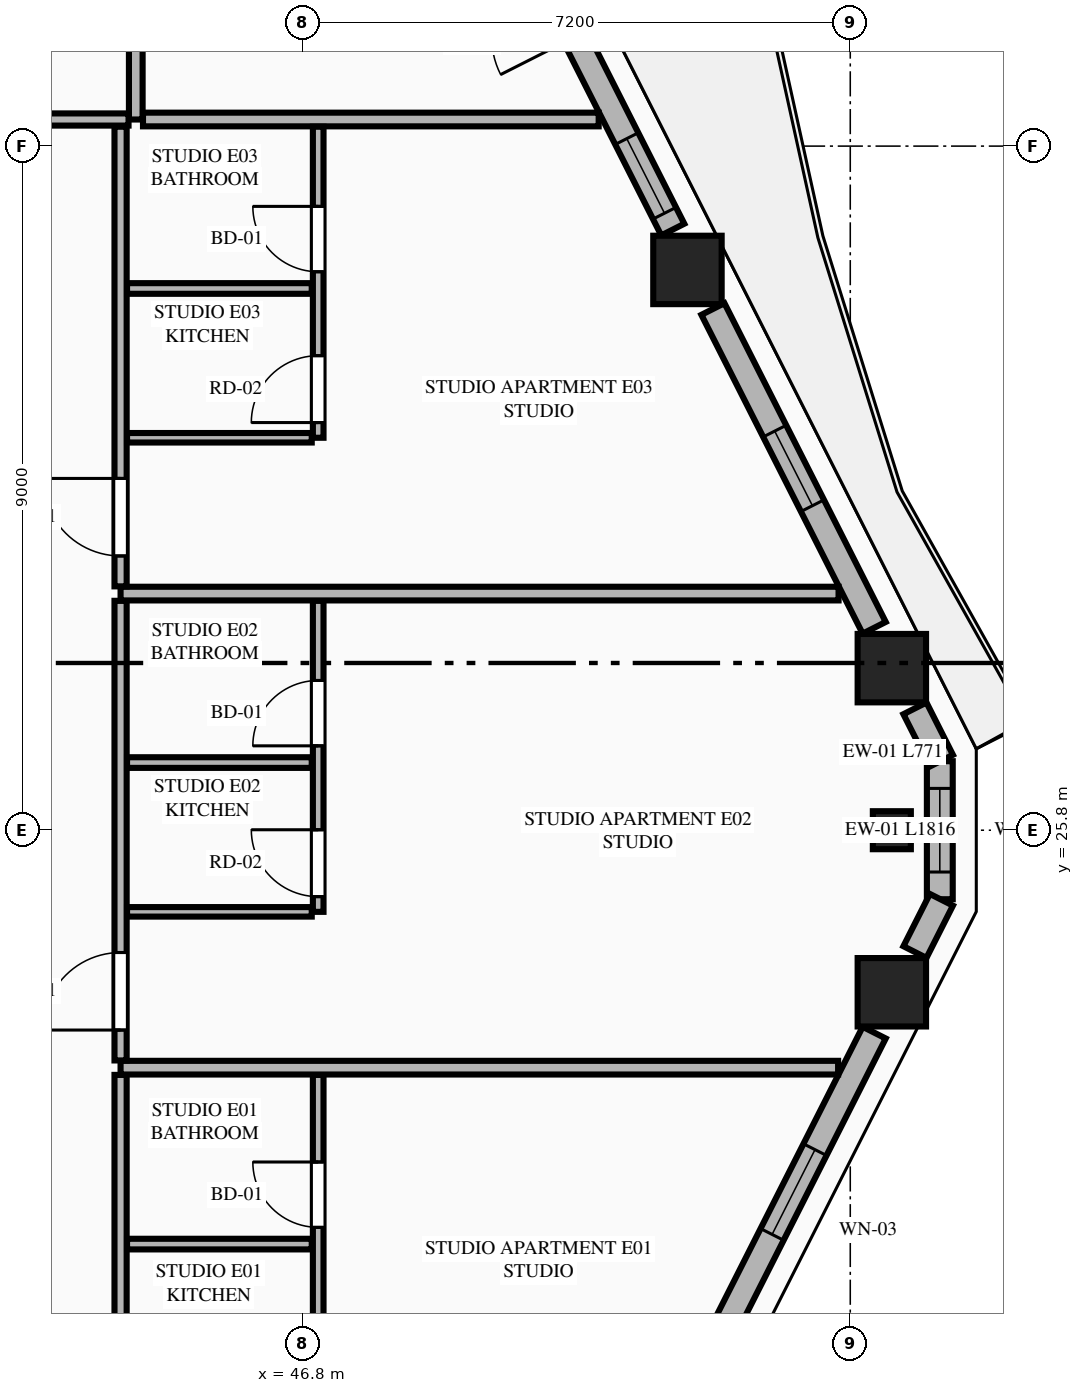
"""IFC4 building model, lengths in metres.
Left out: names, types, materials, properties, quantities, classifications, styles, units other than length and angle.
Written with IfcOpenShell. Run it as: python <this file> out.ifc"""

import sys

from ifc_helpers import new_model, si_unit, direction, frame, frame_2d, origin, origin_2d, place, context, subcontext, project, spatial, rectangle, extrude, element, fill, save


model = new_model("IFC4")
c1 = context("Model", 3, precision=1e-05, world=origin(), true_north=direction((0.0, 1.0)))
c2 = subcontext(c1, "Body", "Model", "MODEL_VIEW")
j1 = project(units=[si_unit("LENGTHUNIT", "METRE"), si_unit("PLANEANGLEUNIT", "RADIAN")], contexts=[c1])
p1 = place(None, origin())
s1 = spatial("IfcSite", under=j1, at=p1, CompositionType="ELEMENT")
p2 = place(p1, origin())
s2 = spatial("IfcBuilding", under=s1, at=p2, CompositionType="ELEMENT")
p3 = place(p2, frame((0.0, 0.0, 200.3)))
s3 = spatial("IfcBuildingStorey", under=s2, at=p3, CompositionType="ELEMENT", Elevation=200.3)
for number, where, z_axis, x_axis in (
    (1, (54.547, 23.668, 0.0), (0.0, 0.0, 1.0), (1.0, 0.0, 0.0)),
    (2, (54.547, 27.932, 0.0), (0.0, 0.0, 1.0), (1.0, 0.0, 0.0)),
    (3, (51.858, 33.171, 0.0), (0.0, 0.0, 1.0), (1.0, 0.0, 0.0)),
):
    element("IfcColumn", number, at=place(p3, frame(where, z_axis=z_axis, x_axis=x_axis)), inside=s3, PredefinedType="COLUMN", context=c2, shape_type="SweptSolid", body=[
        extrude(rectangle(XDim=0.9, YDim=0.9, at=origin_2d()), origin(), (0.0, 0.0, 1.0), 3.55),
    ])
p4 = place(p3, frame((54.547, 25.8, 0.0), z_axis=(0.0, 0.0, 1.0), x_axis=(0.0, 1.0, 0.0)))
e4 = element("IfcColumn", 4, at=p4, inside=s3, PredefinedType="PILASTER", context=c2, shape_type="SweptSolid", body=[
    extrude(rectangle(XDim=0.5, YDim=0.35, at=origin_2d()), origin(), (0.0, 0.0, 1.0), 3.55),
])
p5 = place(p3, frame((55.178, 24.892, 0.0), z_axis=(0.0, 0.0, 1.0), x_axis=(0.0, 1.0, 0.0)))
e5 = element("IfcWall", 5, at=p5, inside=s3, PredefinedType="STANDARD", context=c2, shape_type="SweptSolid", body=[
    extrude(rectangle(XDim=1.816, YDim=0.34, at=frame_2d((0.908, 0.0))), origin(), (0.0, 0.0, 1.0), 3.35),
])
p6 = place(p5, frame((0.358, 0.0, 0.75)))
e6 = element("IfcOpeningElement", 6, at=p6, cuts=e5, PredefinedType="OPENING", context=c2, shape_type="SweptSolid", body=[
    extrude(rectangle(XDim=1.1, YDim=2.0, at=frame_2d((0.55, 1.0))), frame((0.0, 0.18, 0.0), z_axis=(0.0, -1.0, 0.0), x_axis=(1.0, 0.0, 0.0)), (0.0, 0.0, 1.0), 0.36),
])
p7 = place(p3, frame((52.193, 18.943, 0.0), z_axis=(0.0, 0.0, 1.0), x_axis=(0.451447222193, 0.892297823361, 0.0)))
e7 = element("IfcWall", 7, at=p7, inside=s3, PredefinedType="STANDARD", context=c2, shape_type="SweptSolid", body=[
    extrude(rectangle(XDim=4.7, YDim=0.34, at=frame_2d((2.35, 0.0))), origin(), (0.0, 0.0, 1.0), 2.883),
])
p8 = place(p7, frame((1.725, 0.0, 0.75)))
e8 = element("IfcOpeningElement", 8, at=p8, cuts=e7, PredefinedType="OPENING", context=c2, shape_type="SweptSolid", body=[
    extrude(rectangle(XDim=1.25, YDim=1.95, at=frame_2d((0.625, 0.975))), frame((0.0, 0.18, 0.0), z_axis=(0.0, -1.0, 0.0), x_axis=(1.0, 0.0, 0.0)), (0.0, 0.0, 1.0), 0.36),
])
for number, where, z_axis, x_axis in (
    (9, (54.851, 24.197, 0.0), (0.0, 0.0, 1.0), (0.451, 0.892, 0.0)),
    (10, (55.199, 26.715, 0.0), (0.0, 0.0, 1.0), (-0.451, 0.892, 0.0)),
):
    element("IfcWall", number, at=place(p3, frame(where, z_axis=z_axis, x_axis=x_axis)), inside=s3, PredefinedType="STANDARD", context=c2, shape_type="SweptSolid", body=[
        extrude(rectangle(XDim=0.771, YDim=0.34, at=frame_2d((0.385, 0.0))), origin(), (0.0, 0.0, 1.0), 3.35),
    ])
p9 = place(p3, frame((54.315, 28.463, 0.0), z_axis=(0.0, 0.0, 1.0), x_axis=(-0.451426298588, 0.892308409096, 0.0)))
e11 = element("IfcWall", 11, at=p9, inside=s3, PredefinedType="STANDARD", context=c2, shape_type="SweptSolid", body=[
    extrude(rectangle(XDim=4.7, YDim=0.34, at=frame_2d((2.35, 0.0))), origin(), (0.0, 0.0, 1.0), 2.883),
])
p10 = place(p9, frame((1.8, 0.0, 0.75)))
e12 = element("IfcOpeningElement", 12, at=p10, cuts=e11, PredefinedType="OPENING", context=c2, shape_type="SweptSolid", body=[
    extrude(rectangle(XDim=1.1, YDim=1.983, at=frame_2d((0.55, 0.991))), frame((0.0, 0.18, 0.0), z_axis=(0.0, -1.0, 0.0), x_axis=(1.0, 0.0, 0.0)), (0.0, 0.0, 1.0), 0.36),
])
p11 = place(p3, frame((51.665, 33.702, 0.0), z_axis=(0.0, 0.0, 1.0), x_axis=(-0.451524246964, 0.89225884944, 0.0)))
e13 = element("IfcWall", 13, at=p11, inside=s3, PredefinedType="STANDARD", context=c2, shape_type="SweptSolid", body=[
    extrude(rectangle(XDim=4.91, YDim=0.34, at=frame_2d((2.455, 0.0))), origin(), (0.0, 0.0, 1.0), 2.883),
])
p12 = place(p11, frame((2.842, 0.0, 0.0)))
e14 = element("IfcOpeningElement", 14, at=p12, cuts=e13, PredefinedType="OPENING", context=c2, shape_type="SweptSolid", body=[
    extrude(rectangle(XDim=1.1, YDim=2.25, at=frame_2d((0.55, 1.125))), frame((0.0, 0.18, 0.0), z_axis=(0.0, -1.0, 0.0), x_axis=(1.0, 0.0, 0.0)), (0.0, 0.0, 1.0), 0.36),
])
p13 = place(p11, frame((0.241, 0.0, 0.75)))
e15 = element("IfcOpeningElement", 15, at=p13, cuts=e13, PredefinedType="OPENING", context=c2, shape_type="SweptSolid", body=[
    extrude(rectangle(XDim=1.1, YDim=1.983, at=frame_2d((0.55, 0.991))), frame((0.0, 0.18, 0.0), z_axis=(0.0, -1.0, 0.0), x_axis=(1.0, 0.0, 0.0)), (0.0, 0.0, 1.0), 0.36),
])
p14 = place(p3, frame((44.6, 35.15, 0.0), z_axis=(0.0, 0.0, 1.0), x_axis=(0.0, 1.0, 0.0)))
e16 = element("IfcWall", 16, at=p14, inside=s3, PredefinedType="PARTITIONING", context=c2, shape_type="SweptSolid", body=[
    extrude(rectangle(XDim=10.482, YDim=0.18, at=frame_2d((5.241, 0.0))), origin(), (0.0, 0.0, 1.0), 3.35),
])
p15 = place(p3, frame((36.038, 35.15, 0.0), z_axis=(0.0, 0.0, 1.0), x_axis=(1.0, 0.0, 0.0)))
e17 = element("IfcWall", 17, at=p15, inside=s3, PredefinedType="PARTITIONING", context=c2, shape_type="SweptSolid", body=[
    extrude(rectangle(XDim=8.467, YDim=0.16, at=frame_2d((4.233, 0.0))), origin(), (0.0, 0.0, 1.0), 3.35),
])
p16 = place(p15, frame((6.212, 0.0, 0.0)))
e18 = element("IfcOpeningElement", 18, at=p16, cuts=e17, PredefinedType="OPENING", context=c2, shape_type="SweptSolid", body=[
    extrude(rectangle(XDim=1.02, YDim=2.25, at=frame_2d((0.51, 1.125))), frame((0.0, 0.09, 0.0), z_axis=(0.0, -1.0, 0.0), x_axis=(1.0, 0.0, 0.0)), (0.0, 0.0, 1.0), 0.18),
])
p17 = place(p3, frame((44.695, 35.15, 0.0), z_axis=(0.0, 0.0, 1.0), x_axis=(1.0, 0.0, 0.0)))
e19 = element("IfcWall", 19, at=p17, inside=s3, PredefinedType="PARTITIONING", context=c2, shape_type="SweptSolid", body=[
    extrude(rectangle(XDim=5.995, YDim=0.18, at=frame_2d((2.998, 0.0))), origin(), (0.0, 0.0, 1.0), 3.35),
])
p18 = place(p3, frame((44.4, 16.345, 0.0), z_axis=(0.0, 0.0, 1.0), x_axis=(0.0, 1.0, 0.0)))
e20 = element("IfcWall", 20, at=p18, inside=s3, PredefinedType="PARTITIONING", context=c2, shape_type="SweptSolid", body=[
    extrude(rectangle(XDim=6.236, YDim=0.16, at=frame_2d((3.118, 0.0))), origin(), (0.0, 0.0, 1.0), 3.35),
])
p19 = place(p18, frame((0.4, 0.0, 0.0)))
e21 = element("IfcOpeningElement", 21, at=p19, cuts=e20, PredefinedType="OPENING", context=c2, shape_type="SweptSolid", body=[
    extrude(rectangle(XDim=1.02, YDim=2.25, at=frame_2d((0.51, 1.125))), frame((0.0, 0.09, 0.0), z_axis=(0.0, -1.0, 0.0), x_axis=(1.0, 0.0, 0.0)), (0.0, 0.0, 1.0), 0.18),
])
p20 = place(p3, frame((47.0, 18.3, 0.0), z_axis=(0.0, 0.0, 1.0), x_axis=(0.0, 1.0, 0.0)))
e22 = element("IfcWall", 22, at=p20, inside=s3, PredefinedType="PLUMBINGWALL", context=c2, shape_type="SweptSolid", body=[
    extrude(rectangle(XDim=4.281, YDim=0.14, at=frame_2d((2.141, 0.0))), origin(), (0.0, 0.0, 1.0), 3.35),
])
p21 = place(p20, frame((2.275, 0.0, 0.0)))
e23 = element("IfcOpeningElement", 23, at=p21, cuts=e22, PredefinedType="OPENING", context=c2, shape_type="SweptSolid", body=[
    extrude(rectangle(XDim=0.86, YDim=2.1, at=frame_2d((0.43, 1.05))), frame((0.0, 0.08, 0.0), z_axis=(0.0, -1.0, 0.0), x_axis=(1.0, 0.0, 0.0)), (0.0, 0.0, 1.0), 0.16),
])
p22 = place(p20, frame((0.2, 0.0, 0.0)))
e24 = element("IfcOpeningElement", 24, at=p22, cuts=e22, PredefinedType="OPENING", context=c2, shape_type="SweptSolid", body=[
    extrude(rectangle(XDim=0.88, YDim=2.15, at=frame_2d((0.44, 1.075))), frame((0.0, 0.08, 0.0), z_axis=(0.0, -1.0, 0.0), x_axis=(1.0, 0.0, 0.0)), (0.0, 0.0, 1.0), 0.16),
])
p23 = place(p3, frame((44.485, 20.355, 0.0), z_axis=(0.0, 0.0, 1.0), x_axis=(1.0, 0.0, 0.0)))
e25 = element("IfcWall", 25, at=p23, inside=s3, PredefinedType="PLUMBINGWALL", context=c2, shape_type="SweptSolid", body=[
    extrude(rectangle(XDim=2.43, YDim=0.14, at=frame_2d((1.215, 0.0))), origin(), (0.0, 0.0, 1.0), 3.35),
])
p24 = place(p3, frame((44.4, 22.676, 0.0), z_axis=(0.0, 0.0, 1.0), x_axis=(1.0, 0.0, 0.0)))
e26 = element("IfcWall", 26, at=p24, inside=s3, PredefinedType="PARTITIONING", context=c2, shape_type="SweptSolid", body=[
    extrude(rectangle(XDim=9.44, YDim=0.18, at=frame_2d((4.72, 0.0))), origin(), (0.0, 0.0, 1.0), 3.35),
])
p25 = place(p3, frame((44.4, 22.771, 0.0), z_axis=(0.0, 0.0, 1.0), x_axis=(0.0, 1.0, 0.0)))
e27 = element("IfcWall", 27, at=p25, inside=s3, PredefinedType="PARTITIONING", context=c2, shape_type="SweptSolid", body=[
    extrude(rectangle(XDim=6.047, YDim=0.16, at=frame_2d((3.023, 0.0))), origin(), (0.0, 0.0, 1.0), 3.35),
])
p26 = place(p25, frame((0.4, 0.0, 0.0)))
e28 = element("IfcOpeningElement", 28, at=p26, cuts=e27, PredefinedType="OPENING", context=c2, shape_type="SweptSolid", body=[
    extrude(rectangle(XDim=1.02, YDim=2.25, at=frame_2d((0.51, 1.125))), frame((0.0, 0.09, 0.0), z_axis=(0.0, -1.0, 0.0), x_axis=(1.0, 0.0, 0.0)), (0.0, 0.0, 1.0), 0.18),
])
p27 = place(p3, frame((44.485, 24.726, 0.0), z_axis=(0.0, 0.0, 1.0), x_axis=(1.0, 0.0, 0.0)))
e29 = element("IfcWall", 29, at=p27, inside=s3, PredefinedType="PARTITIONING", context=c2, shape_type="SweptSolid", body=[
    extrude(rectangle(XDim=2.43, YDim=0.125, at=frame_2d((1.215, 0.0))), origin(), (0.0, 0.0, 1.0), 3.35),
])
p28 = place(p3, frame((47.0, 24.726, 0.0), z_axis=(0.0, 0.0, 1.0), x_axis=(0.0, 1.0, 0.0)))
e30 = element("IfcWall", 30, at=p28, inside=s3, PredefinedType="PLUMBINGWALL", context=c2, shape_type="SweptSolid", body=[
    extrude(rectangle(XDim=4.092, YDim=0.14, at=frame_2d((2.046, 0.0))), origin(), (0.0, 0.0, 1.0), 3.35),
])
p29 = place(p28, frame((2.184, 0.0, 0.0)))
e31 = element("IfcOpeningElement", 31, at=p29, cuts=e30, PredefinedType="OPENING", context=c2, shape_type="SweptSolid", body=[
    extrude(rectangle(XDim=0.86, YDim=2.1, at=frame_2d((0.43, 1.05))), frame((0.0, 0.08, 0.0), z_axis=(0.0, -1.0, 0.0), x_axis=(1.0, 0.0, 0.0)), (0.0, 0.0, 1.0), 0.16),
])
p30 = place(p28, frame((0.2, 0.0, 0.0)))
e32 = element("IfcOpeningElement", 32, at=p30, cuts=e30, PredefinedType="OPENING", context=c2, shape_type="SweptSolid", body=[
    extrude(rectangle(XDim=0.88, YDim=2.15, at=frame_2d((0.44, 1.075))), frame((0.0, 0.08, 0.0), z_axis=(0.0, -1.0, 0.0), x_axis=(1.0, 0.0, 0.0)), (0.0, 0.0, 1.0), 0.16),
])
p31 = place(p3, frame((44.485, 26.69, 0.0), z_axis=(0.0, 0.0, 1.0), x_axis=(1.0, 0.0, 0.0)))
e33 = element("IfcWall", 33, at=p31, inside=s3, PredefinedType="PLUMBINGWALL", context=c2, shape_type="SweptSolid", body=[
    extrude(rectangle(XDim=2.43, YDim=0.14, at=frame_2d((1.215, 0.0))), origin(), (0.0, 0.0, 1.0), 3.35),
])
p32 = place(p3, frame((44.4, 28.913, 0.0), z_axis=(0.0, 0.0, 1.0), x_axis=(1.0, 0.0, 0.0)))
e34 = element("IfcWall", 34, at=p32, inside=s3, PredefinedType="PARTITIONING", context=c2, shape_type="SweptSolid", body=[
    extrude(rectangle(XDim=9.446, YDim=0.18, at=frame_2d((4.723, 0.0))), origin(), (0.0, 0.0, 1.0), 3.35),
])
p33 = place(p3, frame((44.4, 29.008, 0.0), z_axis=(0.0, 0.0, 1.0), x_axis=(0.0, 1.0, 0.0)))
e35 = element("IfcWall", 35, at=p33, inside=s3, PredefinedType="PARTITIONING", context=c2, shape_type="SweptSolid", body=[
    extrude(rectangle(XDim=6.047, YDim=0.16, at=frame_2d((3.023, 0.0))), origin(), (0.0, 0.0, 1.0), 3.35),
])
p34 = place(p33, frame((0.4, 0.0, 0.0)))
e36 = element("IfcOpeningElement", 36, at=p34, cuts=e35, PredefinedType="OPENING", context=c2, shape_type="SweptSolid", body=[
    extrude(rectangle(XDim=1.02, YDim=2.25, at=frame_2d((0.51, 1.125))), frame((0.0, 0.09, 0.0), z_axis=(0.0, -1.0, 0.0), x_axis=(1.0, 0.0, 0.0)), (0.0, 0.0, 1.0), 0.18),
])
p35 = place(p3, frame((44.485, 30.963, 0.0), z_axis=(0.0, 0.0, 1.0), x_axis=(1.0, 0.0, 0.0)))
e37 = element("IfcWall", 37, at=p35, inside=s3, PredefinedType="PARTITIONING", context=c2, shape_type="SweptSolid", body=[
    extrude(rectangle(XDim=2.43, YDim=0.125, at=frame_2d((1.215, 0.0))), origin(), (0.0, 0.0, 1.0), 3.35),
])
p36 = place(p3, frame((47.0, 30.963, 0.0), z_axis=(0.0, 0.0, 1.0), x_axis=(0.0, 1.0, 0.0)))
e38 = element("IfcWall", 38, at=p36, inside=s3, PredefinedType="PLUMBINGWALL", context=c2, shape_type="SweptSolid", body=[
    extrude(rectangle(XDim=4.092, YDim=0.14, at=frame_2d((2.046, 0.0))), origin(), (0.0, 0.0, 1.0), 3.35),
])
p37 = place(p36, frame((2.184, 0.0, 0.0)))
e39 = element("IfcOpeningElement", 39, at=p37, cuts=e38, PredefinedType="OPENING", context=c2, shape_type="SweptSolid", body=[
    extrude(rectangle(XDim=0.86, YDim=2.1, at=frame_2d((0.43, 1.05))), frame((0.0, 0.08, 0.0), z_axis=(0.0, -1.0, 0.0), x_axis=(1.0, 0.0, 0.0)), (0.0, 0.0, 1.0), 0.16),
])
p38 = place(p36, frame((0.2, 0.0, 0.0)))
e40 = element("IfcOpeningElement", 40, at=p38, cuts=e38, PredefinedType="OPENING", context=c2, shape_type="SweptSolid", body=[
    extrude(rectangle(XDim=0.88, YDim=2.15, at=frame_2d((0.44, 1.075))), frame((0.0, 0.08, 0.0), z_axis=(0.0, -1.0, 0.0), x_axis=(1.0, 0.0, 0.0)), (0.0, 0.0, 1.0), 0.16),
])
p39 = place(p3, frame((44.485, 32.927, 0.0), z_axis=(0.0, 0.0, 1.0), x_axis=(1.0, 0.0, 0.0)))
e41 = element("IfcWall", 41, at=p39, inside=s3, PredefinedType="PLUMBINGWALL", context=c2, shape_type="SweptSolid", body=[
    extrude(rectangle(XDim=2.43, YDim=0.14, at=frame_2d((1.215, 0.0))), origin(), (0.0, 0.0, 1.0), 3.35),
])
p40 = place(p8, origin())
e42 = element("IfcWindow", 42, at=p40, inside=s3, PartitioningType="SINGLE_PANEL", PredefinedType="WINDOW", context=c2, shape_type="SweptSolid", body=[
    extrude(rectangle(XDim=1.25, YDim=1.95, at=frame_2d((0.625, 0.975))), frame((0.0, 0.03, 0.0), z_axis=(0.0, -1.0, 0.0), x_axis=(1.0, 0.0, 0.0)), (0.0, 0.0, 1.0), 0.06),
])
fill(e8, e42)
p41 = place(p10, origin())
e43 = element("IfcWindow", 43, at=p41, inside=s3, PartitioningType="SINGLE_PANEL", PredefinedType="WINDOW", context=c2, shape_type="SweptSolid", body=[
    extrude(rectangle(XDim=1.1, YDim=1.983, at=frame_2d((0.55, 0.991))), frame((0.0, 0.03, 0.0), z_axis=(0.0, -1.0, 0.0), x_axis=(1.0, 0.0, 0.0)), (0.0, 0.0, 1.0), 0.06),
])
fill(e12, e43)
p42 = place(p21, origin())
e44 = element("IfcDoor", 44, at=p42, inside=s3, OperationType="SINGLE_SWING_RIGHT", PredefinedType="DOOR", context=c2, shape_type="SweptSolid", body=[
    extrude(rectangle(XDim=0.86, YDim=2.1, at=frame_2d((0.43, 1.05))), frame((0.0, 0.025, 0.0), z_axis=(0.0, -1.0, 0.0), x_axis=(1.0, 0.0, 0.0)), (0.0, 0.0, 1.0), 0.05),
])
fill(e23, e44)
p43 = place(p29, origin())
e45 = element("IfcDoor", 45, at=p43, inside=s3, OperationType="SINGLE_SWING_LEFT", PredefinedType="DOOR", context=c2, shape_type="SweptSolid", body=[
    extrude(rectangle(XDim=0.86, YDim=2.1, at=frame_2d((0.43, 1.05))), frame((0.0, 0.025, 0.0), z_axis=(0.0, -1.0, 0.0), x_axis=(1.0, 0.0, 0.0)), (0.0, 0.0, 1.0), 0.05),
])
fill(e31, e45)
p44 = place(p26, origin())
e46 = element("IfcDoor", 46, at=p44, inside=s3, OperationType="SINGLE_SWING_LEFT", PredefinedType="DOOR", context=c2, shape_type="SweptSolid", body=[
    extrude(rectangle(XDim=1.02, YDim=2.25, at=frame_2d((0.51, 1.125))), frame((0.0, 0.025, 0.0), z_axis=(0.0, -1.0, 0.0), x_axis=(1.0, 0.0, 0.0)), (0.0, 0.0, 1.0), 0.05),
])
fill(e28, e46)
p45 = place(p30, origin())
e47 = element("IfcDoor", 47, at=p45, inside=s3, OperationType="SINGLE_SWING_RIGHT", PredefinedType="DOOR", context=c2, shape_type="SweptSolid", body=[
    extrude(rectangle(XDim=0.88, YDim=2.15, at=frame_2d((0.44, 1.075))), frame((0.0, 0.025, 0.0), z_axis=(0.0, -1.0, 0.0), x_axis=(1.0, 0.0, 0.0)), (0.0, 0.0, 1.0), 0.05),
])
fill(e32, e47)
p46 = place(p37, origin())
e48 = element("IfcDoor", 48, at=p46, inside=s3, OperationType="SINGLE_SWING_RIGHT", PredefinedType="DOOR", context=c2, shape_type="SweptSolid", body=[
    extrude(rectangle(XDim=0.86, YDim=2.1, at=frame_2d((0.43, 1.05))), frame((0.0, 0.025, 0.0), z_axis=(0.0, -1.0, 0.0), x_axis=(1.0, 0.0, 0.0)), (0.0, 0.0, 1.0), 0.05),
])
fill(e39, e48)
p47 = place(p34, origin())
e49 = element("IfcDoor", 49, at=p47, inside=s3, OperationType="SINGLE_SWING_RIGHT", PredefinedType="DOOR", context=c2, shape_type="SweptSolid", body=[
    extrude(rectangle(XDim=1.02, YDim=2.25, at=frame_2d((0.51, 1.125))), frame((0.0, 0.025, 0.0), z_axis=(0.0, -1.0, 0.0), x_axis=(1.0, 0.0, 0.0)), (0.0, 0.0, 1.0), 0.05),
])
fill(e36, e49)
p48 = place(p38, origin())
e50 = element("IfcDoor", 50, at=p48, inside=s3, OperationType="SINGLE_SWING_LEFT", PredefinedType="DOOR", context=c2, shape_type="SweptSolid", body=[
    extrude(rectangle(XDim=0.88, YDim=2.15, at=frame_2d((0.44, 1.075))), frame((0.0, 0.025, 0.0), z_axis=(0.0, -1.0, 0.0), x_axis=(1.0, 0.0, 0.0)), (0.0, 0.0, 1.0), 0.05),
])
fill(e40, e50)
p49 = place(p13, origin())
e51 = element("IfcWindow", 51, at=p49, inside=s3, PartitioningType="SINGLE_PANEL", PredefinedType="WINDOW", context=c2, shape_type="SweptSolid", body=[
    extrude(rectangle(XDim=1.1, YDim=1.983, at=frame_2d((0.55, 0.991))), frame((0.0, 0.03, 0.0), z_axis=(0.0, -1.0, 0.0), x_axis=(1.0, 0.0, 0.0)), (0.0, 0.0, 1.0), 0.06),
])
fill(e15, e51)
p50 = place(p6, origin())
e52 = element("IfcWindow", 52, at=p50, inside=s3, PartitioningType="SINGLE_PANEL", PredefinedType="WINDOW", context=c2, shape_type="SweptSolid", body=[
    extrude(rectangle(XDim=1.1, YDim=2.0, at=frame_2d((0.55, 1.0))), frame((0.0, 0.03, 0.0), z_axis=(0.0, -1.0, 0.0), x_axis=(1.0, 0.0, 0.0)), (0.0, 0.0, 1.0), 0.06),
])
fill(e6, e52)
save(model, sys.argv[1])
